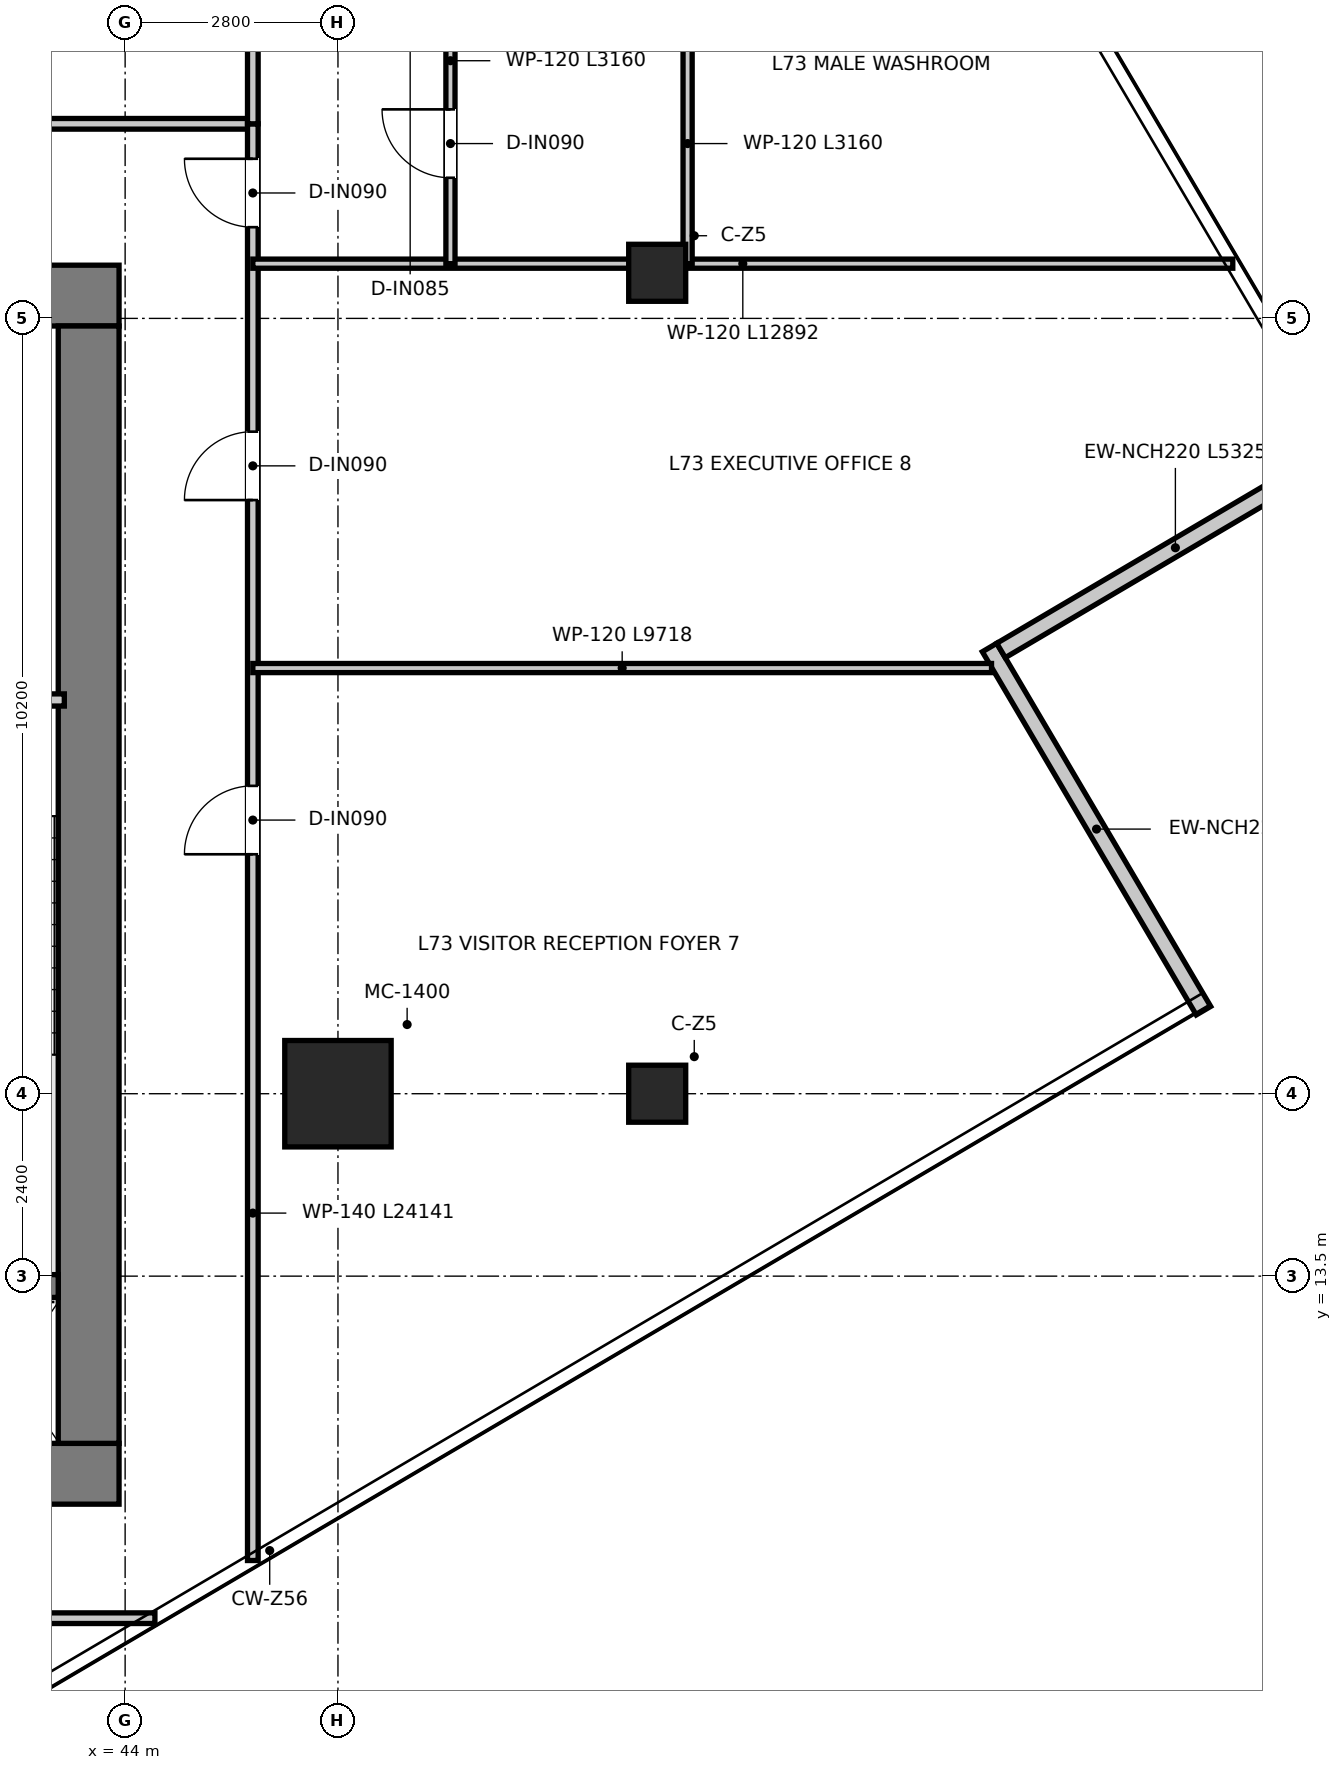
"""IFC4 building model, lengths in metres.
Left out: names, types, materials, properties, quantities, classifications, styles, units other than length and angle.
Written with IfcOpenShell. Run it as: python <this file> out.ifc"""

import sys

from ifc_helpers import new_model, si_unit, direction, frame, frame_2d, origin, origin_2d, place, context, subcontext, project, spatial, rectangle, extrude, source, transform, mapped, element, fill, save


model = new_model("IFC4")
c1 = context("Model", 3, precision=1e-05, world=origin(), true_north=direction((0.0, 1.0)))
c2 = subcontext(c1, "Body", "Model", "MODEL_VIEW")
j1 = project(units=[si_unit("LENGTHUNIT", "METRE"), si_unit("PLANEANGLEUNIT", "RADIAN")], contexts=[c1])
p1 = place(None, origin())
s1 = spatial("IfcSite", under=j1, at=p1, CompositionType="ELEMENT")
p2 = place(p1, origin())
s2 = spatial("IfcBuilding", under=s1, at=p2, CompositionType="ELEMENT")
p3 = place(p2, frame((0.0, 0.0, 299.0)))
s3 = spatial("IfcBuildingStorey", under=s2, at=p3, CompositionType="ELEMENT", Elevation=299.0)
p4 = place(p3, frame((28.08, 10.9, 0.0), z_axis=(0.0, 0.0, 1.0), x_axis=(1.0, 0.0, 0.0)))
e1 = element("IfcWall", 1, at=p4, inside=s3, PredefinedType="SHEAR", context=c2, shape_type="SweptSolid", body=[
    extrude(rectangle(XDim=15.84, YDim=0.8, at=frame_2d((7.92, 0.0))), origin(), (0.0, 0.0, 1.0), 3.95),
])
p5 = place(p3, frame((28.08, 26.4, 0.0), z_axis=(0.0, 0.0, 1.0), x_axis=(1.0, 0.0, 0.0)))
e2 = element("IfcWall", 2, at=p5, inside=s3, PredefinedType="SHEAR", context=c2, shape_type="SweptSolid", body=[
    extrude(rectangle(XDim=15.84, YDim=0.8, at=frame_2d((7.92, 0.0))), origin(), (0.0, 0.0, 1.0), 3.95),
])
p6 = place(p5, frame((7.22, 0.0, 0.0)))
e3 = element("IfcOpeningElement", 3, at=p6, cuts=e2, PredefinedType="OPENING", context=c2, shape_type="SweptSolid", body=[
    extrude(rectangle(XDim=1.4, YDim=2.2, at=frame_2d((0.7, 1.1))), frame((0.0, 0.41, 0.0), z_axis=(0.0, -1.0, 0.0), x_axis=(1.0, 0.0, 0.0)), (0.0, 0.0, 1.0), 0.82),
])
p7 = place(p5, frame((1.775, 0.0, 0.0)))
e4 = element("IfcOpeningElement", 4, at=p7, cuts=e2, PredefinedType="OPENING", context=c2, shape_type="SweptSolid", body=[
    extrude(rectangle(XDim=1.05, YDim=2.1, at=frame_2d((0.525, 1.05))), frame((0.0, 0.41, 0.0), z_axis=(0.0, -1.0, 0.0), x_axis=(1.0, 0.0, 0.0)), (0.0, 0.0, 1.0), 0.82),
])
p8 = place(p5, frame((13.015, 0.0, 0.0)))
e5 = element("IfcOpeningElement", 5, at=p8, cuts=e2, PredefinedType="OPENING", context=c2, shape_type="SweptSolid", body=[
    extrude(rectangle(XDim=1.05, YDim=2.1, at=frame_2d((0.525, 1.05))), frame((0.0, 0.41, 0.0), z_axis=(0.0, -1.0, 0.0), x_axis=(1.0, 0.0, 0.0)), (0.0, 0.0, 1.0), 0.82),
])
p9 = place(p3, frame((43.52, 11.3, 0.0), z_axis=(0.0, 0.0, 1.0), x_axis=(0.0, 1.0, 0.0)))
e6 = element("IfcWall", 6, at=p9, inside=s3, PredefinedType="SHEAR", context=c2, shape_type="SweptSolid", body=[
    extrude(rectangle(XDim=14.7, YDim=0.8, at=frame_2d((7.35, 0.0))), origin(), (0.0, 0.0, 1.0), 3.95),
])
p10 = place(p3, frame((40.02, 13.37, 0.0), z_axis=(0.0, 0.0, 1.0), x_axis=(1.0, 0.0, 0.0)))
e7 = element("IfcWall", 7, at=p10, inside=s3, PredefinedType="SHEAR", context=c2, shape_type="SweptSolid", body=[
    extrude(rectangle(XDim=3.1, YDim=0.3, at=frame_2d((1.55, 0.0))), origin(), (0.0, 0.0, 1.0), 3.95),
])
m1 = source(origin(), c2, "Body", "SweptSolid", [
    extrude(rectangle(XDim=1.4, YDim=1.4, at=origin_2d()), origin(), (0.0, 0.0, 1.0), 3.95),
])
p11 = place(p3, frame((46.8, 15.9, 0.0), z_axis=(0.0, 0.0, 1.0), x_axis=(1.0, 0.0, 0.0)))
e8 = element("IfcColumn", 8, at=p11, inside=s3, PredefinedType="USERDEFINED", context=c2, shape_type="MappedRepresentation", body=[
    mapped(m1, transform((0.0, 0.0, 0.0), x_axis=(1.0, 0.0, 0.0), y_axis=(0.0, 1.0, 0.0), z_axis=(0.0, 0.0, 1.0), scale=1.0)),
])
m2 = source(origin(), c2, "Body", "SweptSolid", [
    extrude(rectangle(XDim=0.75, YDim=0.75, at=origin_2d()), origin(), (0.0, 0.0, 1.0), 3.95),
])
for number, where, z_axis, x_axis in (
    (9, (51.0, 26.7, 0.0), (0.0, 0.0, 1.0), (1.0, 0.0, 0.0)),
    (10, (51.0, 15.9, 0.0), (0.0, 0.0, 1.0), (1.0, 0.0, 0.0)),
):
    element("IfcColumn", number, at=place(p3, frame(where, z_axis=z_axis, x_axis=x_axis)), inside=s3, PredefinedType="COLUMN", context=c2, shape_type="MappedRepresentation", body=[
        mapped(m2, transform((0.0, 0.0, 0.0), x_axis=(1.0, 0.0, 0.0), y_axis=(0.0, 1.0, 0.0), z_axis=(0.0, 0.0, 1.0), scale=1.0)),
    ])
p12 = place(p3, frame((58.187, 16.992, 0.0), z_axis=(0.0, 0.0, 1.0), x_axis=(-0.507551078836, 0.861621670092, 0.0)))
e11 = element("IfcWall", 11, at=p12, inside=s3, PredefinedType="ELEMENTEDWALL", context=c2, shape_type="SweptSolid", body=[
    extrude(rectangle(XDim=5.545, YDim=0.22, at=frame_2d((2.772, 0.0))), origin(), (0.0, 0.0, 1.0), 3.67),
])
p13 = place(p3, frame((55.523, 21.731, 0.0), z_axis=(0.0, 0.0, 1.0), x_axis=(0.861627616465, 0.507540984104, 0.0)))
e12 = element("IfcWall", 12, at=p13, inside=s3, PredefinedType="ELEMENTEDWALL", context=c2, shape_type="SweptSolid", body=[
    extrude(rectangle(XDim=5.325, YDim=0.22, at=frame_2d((2.663, 0.0))), origin(), (0.0, 0.0, 1.0), 3.67),
])
p14 = place(p3, frame((40.04, 21.08, 0.0), z_axis=(0.0, 0.0, 1.0), x_axis=(1.0, 0.0, 0.0)))
e13 = element("IfcWall", 13, at=p14, inside=s3, PredefinedType="PARTITIONING", context=c2, shape_type="SweptSolid", body=[
    extrude(rectangle(XDim=3.16, YDim=0.16, at=frame_2d((1.58, 0.0))), origin(), (0.0, 0.0, 1.0), 3.67),
])
p15 = place(p14, frame((1.055, 0.0, 0.0)))
e14 = element("IfcOpeningElement", 14, at=p15, cuts=e13, PredefinedType="OPENING", context=c2, shape_type="SweptSolid", body=[
    extrude(rectangle(XDim=1.05, YDim=2.1, at=frame_2d((0.525, 1.05))), frame((0.0, 0.09, 0.0), z_axis=(0.0, -1.0, 0.0), x_axis=(1.0, 0.0, 0.0)), (0.0, 0.0, 1.0), 0.18),
])
p16 = place(p3, frame((26.32, 28.66, 0.0), z_axis=(0.0, 0.0, 1.0), x_axis=(1.0, 0.0, 0.0)))
e15 = element("IfcWall", 15, at=p16, inside=s3, PredefinedType="PARTITIONING", context=c2, shape_type="SweptSolid", body=[
    extrude(rectangle(XDim=19.36, YDim=0.14, at=frame_2d((9.68, 0.0))), origin(), (0.0, 0.0, 1.0), 3.18),
])
p17 = place(p16, frame((4.265, 0.0, 0.0)))
e16 = element("IfcOpeningElement", 16, at=p17, cuts=e15, PredefinedType="OPENING", context=c2, shape_type="SweptSolid", body=[
    extrude(rectangle(XDim=0.95, YDim=2.1, at=frame_2d((0.475, 1.05))), frame((0.0, 0.08, 0.0), z_axis=(0.0, -1.0, 0.0), x_axis=(1.0, 0.0, 0.0)), (0.0, 0.0, 1.0), 0.16),
])
p18 = place(p16, frame((13.945, 0.0, 0.0)))
e17 = element("IfcOpeningElement", 17, at=p18, cuts=e15, PredefinedType="OPENING", context=c2, shape_type="SweptSolid", body=[
    extrude(rectangle(XDim=0.95, YDim=2.1, at=frame_2d((0.475, 1.05))), frame((0.0, 0.08, 0.0), z_axis=(0.0, -1.0, 0.0), x_axis=(1.0, 0.0, 0.0)), (0.0, 0.0, 1.0), 0.16),
])
p19 = place(p3, frame((45.68, 9.759, 0.0), z_axis=(0.0, 0.0, 1.0), x_axis=(0.0, 1.0, 0.0)))
e18 = element("IfcWall", 18, at=p19, inside=s3, PredefinedType="PARTITIONING", context=c2, shape_type="SweptSolid", body=[
    extrude(rectangle(XDim=18.901, YDim=0.14, at=frame_2d((9.451, 0.0))), origin(), (0.0, 0.0, 1.0), 3.13),
])
p20 = place(p19, frame((17.541, 0.0, 0.0)))
e19 = element("IfcOpeningElement", 19, at=p20, cuts=e18, PredefinedType="OPENING", context=c2, shape_type="SweptSolid", body=[
    extrude(rectangle(XDim=0.9, YDim=2.1, at=frame_2d((0.45, 1.05))), frame((0.0, 0.08, 0.0), z_axis=(0.0, -1.0, 0.0), x_axis=(1.0, 0.0, 0.0)), (0.0, 0.0, 1.0), 0.16),
])
p21 = place(p19, frame((9.291, 0.0, 0.0)))
e20 = element("IfcOpeningElement", 20, at=p21, cuts=e18, PredefinedType="OPENING", context=c2, shape_type="SweptSolid", body=[
    extrude(rectangle(XDim=0.9, YDim=2.1, at=frame_2d((0.45, 1.05))), frame((0.0, 0.08, 0.0), z_axis=(0.0, -1.0, 0.0), x_axis=(1.0, 0.0, 0.0)), (0.0, 0.0, 1.0), 0.16),
])
p22 = place(p19, frame((13.951, 0.0, 0.0)))
e21 = element("IfcOpeningElement", 21, at=p22, cuts=e18, PredefinedType="OPENING", context=c2, shape_type="SweptSolid", body=[
    extrude(rectangle(XDim=0.9, YDim=2.1, at=frame_2d((0.45, 1.05))), frame((0.0, 0.08, 0.0), z_axis=(0.0, -1.0, 0.0), x_axis=(1.0, 0.0, 0.0)), (0.0, 0.0, 1.0), 0.16),
])
p23 = place(p3, frame((23.783, 9.0, 0.0), z_axis=(0.0, 0.0, 1.0), x_axis=(1.0, 0.0, 0.0)))
e22 = element("IfcWall", 22, at=p23, inside=s3, PredefinedType="PARTITIONING", context=c2, shape_type="SweptSolid", body=[
    extrude(rectangle(XDim=20.609, YDim=0.14, at=frame_2d((10.304, 0.0))), origin(), (0.0, 0.0, 1.0), 3.67),
])
p24 = place(p23, frame((11.767, 0.0, 0.0)))
e23 = element("IfcOpeningElement", 23, at=p24, cuts=e22, PredefinedType="OPENING", context=c2, shape_type="SweptSolid", body=[
    extrude(rectangle(XDim=0.9, YDim=2.1, at=frame_2d((0.45, 1.05))), frame((0.0, 0.08, 0.0), z_axis=(0.0, -1.0, 0.0), x_axis=(1.0, 0.0, 0.0)), (0.0, 0.0, 1.0), 0.16),
])
p25 = place(p3, frame((45.68, 26.82, 0.0), z_axis=(0.0, 0.0, 1.0), x_axis=(1.0, 0.0, 0.0)))
e24 = element("IfcWall", 24, at=p25, inside=s3, PredefinedType="PARTITIONING", context=c2, shape_type="SweptSolid", body=[
    extrude(rectangle(XDim=12.893, YDim=0.12, at=frame_2d((6.446, 0.0))), origin(), (0.0, 0.0, 1.0), 3.13),
])
p26 = place(p3, frame((51.4, 26.82, 0.0), z_axis=(0.0, 0.0, 1.0), x_axis=(0.0, 1.0, 0.0)))
e25 = element("IfcWall", 25, at=p26, inside=s3, PredefinedType="PARTITIONING", context=c2, shape_type="SweptSolid", body=[
    extrude(rectangle(XDim=3.16, YDim=0.12, at=frame_2d((1.58, 0.0))), origin(), (0.0, 0.0, 1.0), 3.67),
])
p27 = place(p3, frame((48.28, 26.82, 0.0), z_axis=(0.0, 0.0, 1.0), x_axis=(0.0, 1.0, 0.0)))
e26 = element("IfcWall", 26, at=p27, inside=s3, PredefinedType="PARTITIONING", context=c2, shape_type="SweptSolid", body=[
    extrude(rectangle(XDim=3.16, YDim=0.12, at=frame_2d((1.58, 0.0))), origin(), (0.0, 0.0, 1.0), 3.18),
])
p28 = place(p27, frame((1.13, 0.0, 0.0)))
e27 = element("IfcOpeningElement", 27, at=p28, cuts=e26, PredefinedType="OPENING", context=c2, shape_type="SweptSolid", body=[
    extrude(rectangle(XDim=0.9, YDim=2.1, at=frame_2d((0.45, 1.05))), frame((0.0, 0.07, 0.0), z_axis=(0.0, -1.0, 0.0), x_axis=(1.0, 0.0, 0.0)), (0.0, 0.0, 1.0), 0.14),
])
p29 = place(p3, frame((45.68, 28.66, 0.0), z_axis=(0.0, 0.0, 1.0), x_axis=(0.0, 1.0, 0.0)))
e28 = element("IfcWall", 28, at=p29, inside=s3, PredefinedType="PARTITIONING", context=c2, shape_type="SweptSolid", body=[
    extrude(rectangle(XDim=5.24, YDim=0.14, at=frame_2d((2.62, 0.0))), origin(), (0.0, 0.0, 1.0), 3.43),
])
p30 = place(p3, frame((45.68, 21.5, 0.0), z_axis=(0.0, 0.0, 1.0), x_axis=(1.0, 0.0, 0.0)))
e29 = element("IfcWall", 29, at=p30, inside=s3, PredefinedType="PARTITIONING", context=c2, shape_type="SweptSolid", body=[
    extrude(rectangle(XDim=9.719, YDim=0.12, at=frame_2d((4.859, 0.0))), origin(), (0.0, 0.0, 1.0), 3.13),
])
p31 = place(p20, origin())
e30 = element("IfcDoor", 30, at=p31, inside=s3, OperationType="SINGLE_SWING_RIGHT", PredefinedType="DOOR", context=c2, shape_type="SweptSolid", body=[
    extrude(rectangle(XDim=0.9, YDim=2.1, at=frame_2d((0.45, 1.05))), frame((0.0, 0.025, 0.0), z_axis=(0.0, -1.0, 0.0), x_axis=(1.0, 0.0, 0.0)), (0.0, 0.0, 1.0), 0.05),
])
fill(e19, e30)
p32 = place(p28, origin())
e31 = element("IfcDoor", 31, at=p32, inside=s3, OperationType="SINGLE_SWING_RIGHT", PredefinedType="DOOR", context=c2, shape_type="SweptSolid", body=[
    extrude(rectangle(XDim=0.9, YDim=2.1, at=frame_2d((0.45, 1.05))), frame((0.0, 0.025, 0.0), z_axis=(0.0, -1.0, 0.0), x_axis=(1.0, 0.0, 0.0)), (0.0, 0.0, 1.0), 0.05),
])
fill(e27, e31)
p33 = place(p21, origin())
e32 = element("IfcDoor", 32, at=p33, inside=s3, OperationType="SINGLE_SWING_LEFT", PredefinedType="DOOR", context=c2, shape_type="SweptSolid", body=[
    extrude(rectangle(XDim=0.9, YDim=2.1, at=frame_2d((0.45, 1.05))), frame((0.0, 0.025, 0.0), z_axis=(0.0, -1.0, 0.0), x_axis=(1.0, 0.0, 0.0)), (0.0, 0.0, 1.0), 0.05),
])
fill(e20, e32)
p34 = place(p22, origin())
e33 = element("IfcDoor", 33, at=p34, inside=s3, OperationType="SINGLE_SWING_LEFT", PredefinedType="DOOR", context=c2, shape_type="SweptSolid", body=[
    extrude(rectangle(XDim=0.9, YDim=2.1, at=frame_2d((0.45, 1.05))), frame((0.0, 0.025, 0.0), z_axis=(0.0, -1.0, 0.0), x_axis=(1.0, 0.0, 0.0)), (0.0, 0.0, 1.0), 0.05),
])
fill(e21, e33)
save(model, sys.argv[1])
